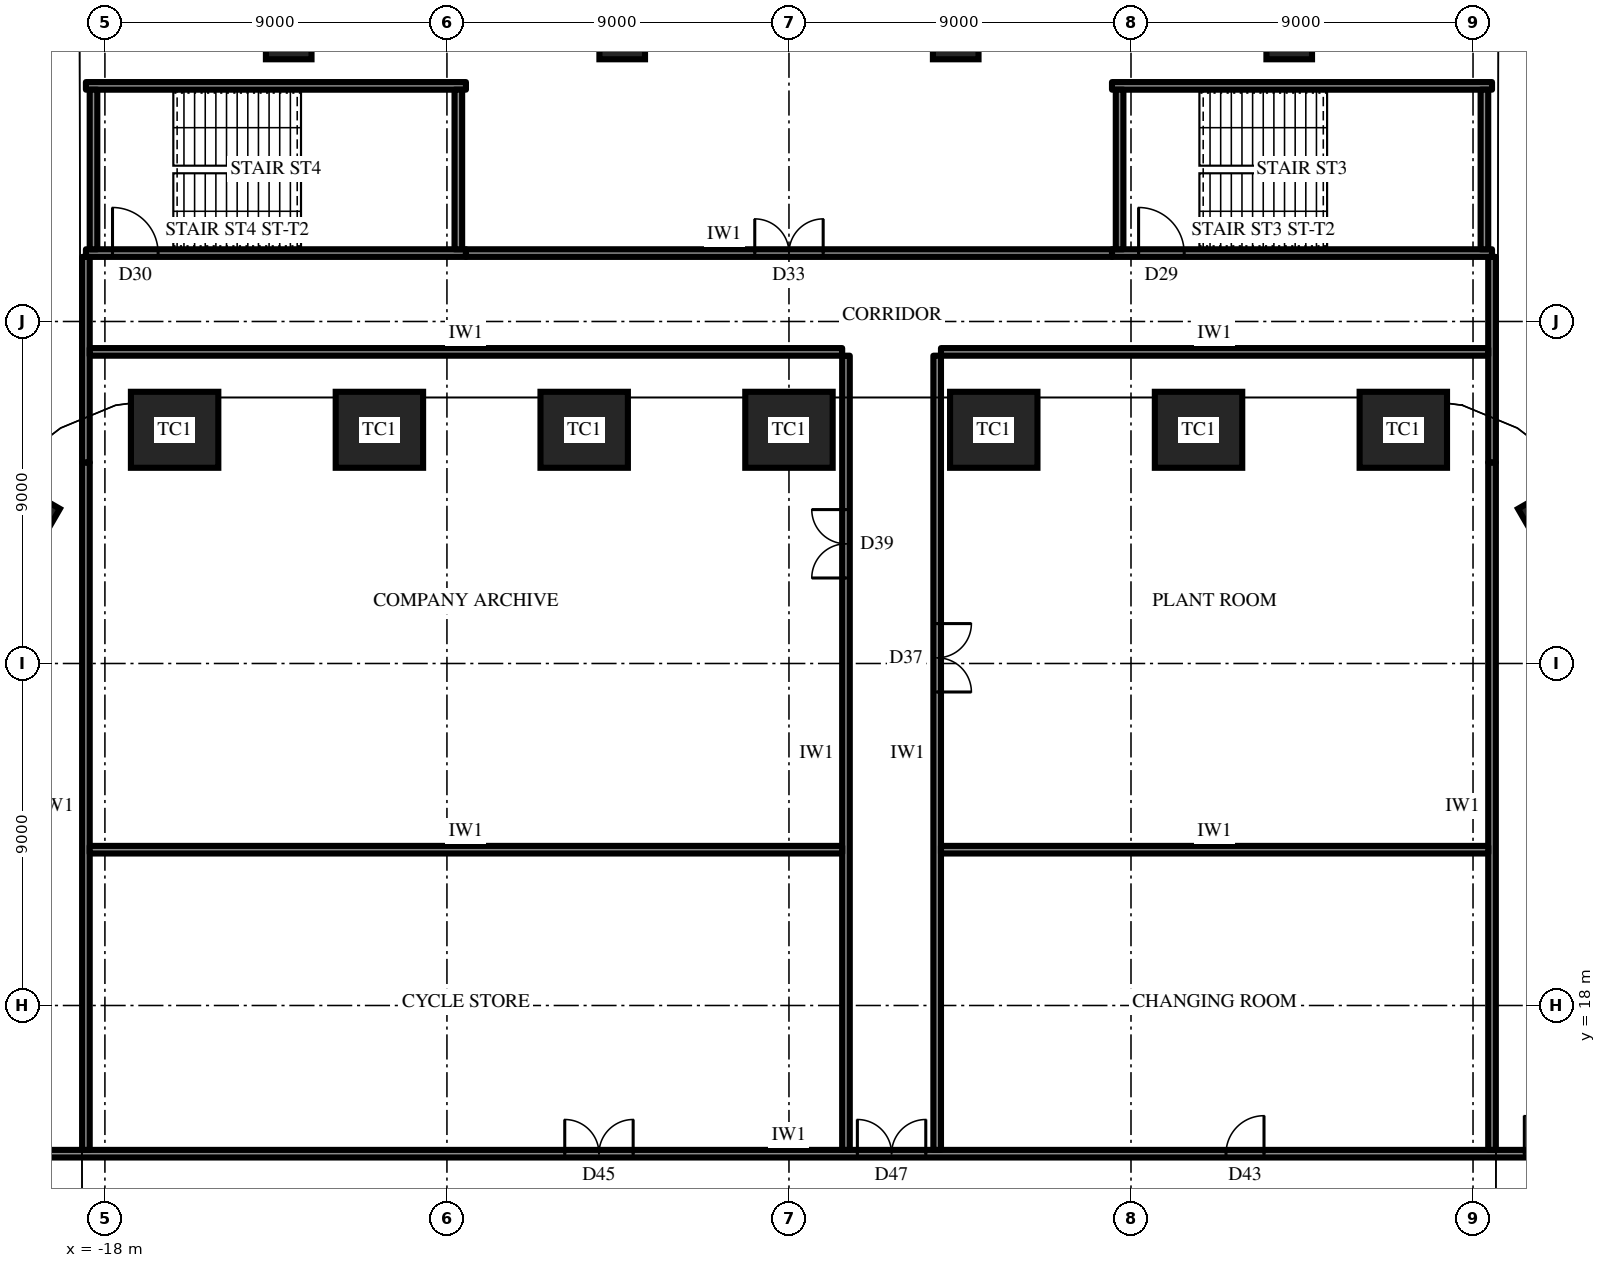
"""IFC4 building model, lengths in metres.
Left out: names, types, materials, properties, quantities, classifications, styles, units other than length and angle.
Written with IfcOpenShell. Run it as: python <this file> out.ifc"""

import sys

from ifc_helpers import new_model, si_unit, direction, frame, frame_2d, origin, origin_2d, place, context, subcontext, project, spatial, rectangle, extrude, element, fill, save


model = new_model("IFC4")
c1 = context("Model", 3, precision=1e-05, world=origin(), true_north=direction((0.0, 1.0)))
c2 = subcontext(c1, "Body", "Model", "MODEL_VIEW")
j1 = project(units=[si_unit("LENGTHUNIT", "METRE"), si_unit("PLANEANGLEUNIT", "RADIAN")], contexts=[c1])
p1 = place(None, origin())
s1 = spatial("IfcSite", under=j1, at=p1, CompositionType="ELEMENT")
p2 = place(p1, origin())
s2 = spatial("IfcBuilding", under=s1, at=p2, CompositionType="ELEMENT")
p3 = place(p2, frame((0.0, 0.0, -4.5)))
s3 = spatial("IfcBuildingStorey", under=s2, at=p3, CompositionType="ELEMENT", Elevation=-4.5)
for number, where, z_axis, x_axis in (
    (1, (20.626, 30.575, 0.0), (0.0, 0.0, 1.0), (-0.5, 0.866, 0.0)),
    (2, (16.166, 33.15, 0.0), (0.0, 0.0, 1.0), (-1.0, 0.0, 0.0)),
    (3, (10.777, 33.15, 0.0), (0.0, 0.0, 1.0), (-1.0, 0.0, 0.0)),
    (4, (5.389, 33.15, 0.0), (0.0, 0.0, 1.0), (-1.0, 0.0, 0.0)),
    (5, (0.0, 33.15, 0.0), (0.0, 0.0, 1.0), (-1.0, 0.0, 0.0)),
    (6, (-5.389, 33.15, 0.0), (0.0, 0.0, 1.0), (-1.0, 0.0, 0.0)),
    (7, (-10.777, 33.15, 0.0), (0.0, 0.0, 1.0), (-1.0, 0.0, 0.0)),
    (8, (-16.166, 33.15, 0.0), (0.0, 0.0, 1.0), (-1.0, 0.0, 0.0)),
    (9, (-20.626, 30.575, 0.0), (0.0, 0.0, 1.0), (-0.5, -0.866, 0.0)),
):
    element("IfcColumn", number, at=place(p3, frame(where, z_axis=z_axis, x_axis=x_axis)), inside=s3, PredefinedType="COLUMN", context=c2, shape_type="SweptSolid", body=[
        extrude(rectangle(XDim=2.3, YDim=2.0, at=origin_2d()), origin(), (0.0, 0.0, 1.0), 4.5),
    ])
p4 = place(p3, frame((8.5, 37.8, 0.0), z_axis=(0.0, 0.0, 1.0), x_axis=(1.0, 0.0, 0.0)))
e10 = element("IfcWall", 10, at=p4, inside=s3, PredefinedType="SHEAR", context=c2, shape_type="SweptSolid", body=[
    extrude(rectangle(XDim=10.0, YDim=0.2, at=frame_2d((5.0, 0.0))), origin(), (0.0, 0.0, 1.0), 4.5),
])
p5 = place(p4, frame((0.7, 0.0, 0.0)))
e11 = element("IfcOpeningElement", 11, at=p5, cuts=e10, PredefinedType="OPENING", context=c2, shape_type="SweptSolid", body=[
    extrude(rectangle(XDim=1.2, YDim=2.2, at=frame_2d((0.6, 1.1))), frame((0.0, 0.11, 0.0), z_axis=(0.0, -1.0, 0.0), x_axis=(1.0, 0.0, 0.0)), (0.0, 0.0, 1.0), 0.22),
])
p6 = place(p3, frame((18.5, 42.2, 0.0), z_axis=(0.0, 0.0, 1.0), x_axis=(-1.0, 0.0, 0.0)))
e12 = element("IfcWall", 12, at=p6, inside=s3, PredefinedType="SHEAR", context=c2, shape_type="SweptSolid", body=[
    extrude(rectangle(XDim=10.0, YDim=0.2, at=frame_2d((5.0, 0.0))), origin(), (0.0, 0.0, 1.0), 4.5),
])
for number, where, z_axis, x_axis in (
    (13, (8.7, 42.1, 0.0), (0.0, 0.0, 1.0), (0.0, -1.0, 0.0)),
    (14, (18.3, 37.9, 0.0), (0.0, 0.0, 1.0), (0.0, 1.0, 0.0)),
):
    element("IfcWall", number, at=place(p3, frame(where, z_axis=z_axis, x_axis=x_axis)), inside=s3, PredefinedType="SHEAR", context=c2, shape_type="SweptSolid", body=[
        extrude(rectangle(XDim=4.2, YDim=0.2, at=frame_2d((2.1, 0.0))), origin(), (0.0, 0.0, 1.0), 4.5),
    ])
p7 = place(p3, frame((-18.5, 37.8, 0.0), z_axis=(0.0, 0.0, 1.0), x_axis=(1.0, 0.0, 0.0)))
e15 = element("IfcWall", 15, at=p7, inside=s3, PredefinedType="SHEAR", context=c2, shape_type="SweptSolid", body=[
    extrude(rectangle(XDim=10.0, YDim=0.2, at=frame_2d((5.0, 0.0))), origin(), (0.0, 0.0, 1.0), 4.5),
])
p8 = place(p7, frame((0.7, 0.0, 0.0)))
e16 = element("IfcOpeningElement", 16, at=p8, cuts=e15, PredefinedType="OPENING", context=c2, shape_type="SweptSolid", body=[
    extrude(rectangle(XDim=1.2, YDim=2.2, at=frame_2d((0.6, 1.1))), frame((0.0, 0.11, 0.0), z_axis=(0.0, -1.0, 0.0), x_axis=(1.0, 0.0, 0.0)), (0.0, 0.0, 1.0), 0.22),
])
p9 = place(p3, frame((-8.5, 42.2, 0.0), z_axis=(0.0, 0.0, 1.0), x_axis=(-1.0, 0.0, 0.0)))
e17 = element("IfcWall", 17, at=p9, inside=s3, PredefinedType="SHEAR", context=c2, shape_type="SweptSolid", body=[
    extrude(rectangle(XDim=10.0, YDim=0.2, at=frame_2d((5.0, 0.0))), origin(), (0.0, 0.0, 1.0), 4.5),
])
for number, where, z_axis, x_axis in (
    (18, (-18.3, 42.1, 0.0), (0.0, 0.0, 1.0), (0.0, -1.0, 0.0)),
    (19, (-8.7, 37.9, 0.0), (0.0, 0.0, 1.0), (0.0, 1.0, 0.0)),
):
    element("IfcWall", number, at=place(p3, frame(where, z_axis=z_axis, x_axis=x_axis)), inside=s3, PredefinedType="SHEAR", context=c2, shape_type="SweptSolid", body=[
        extrude(rectangle(XDim=4.2, YDim=0.2, at=frame_2d((2.1, 0.0))), origin(), (0.0, 0.0, 1.0), 4.5),
    ])
for number, where, z_axis, x_axis in (
    (20, (13.164, 43.5, 0.0), (0.0, 0.0, 1.0), (-1.0, 0.0, 0.0)),
    (21, (4.388, 43.5, 0.0), (0.0, 0.0, 1.0), (-1.0, 0.0, 0.0)),
    (22, (-4.388, 43.5, 0.0), (0.0, 0.0, 1.0), (-1.0, 0.0, 0.0)),
    (23, (-13.164, 43.5, 0.0), (0.0, 0.0, 1.0), (-1.0, 0.0, 0.0)),
):
    element("IfcColumn", number, at=place(p3, frame(where, z_axis=z_axis, x_axis=x_axis)), inside=s3, PredefinedType="COLUMN", context=c2, shape_type="SweptSolid", body=[
        extrude(rectangle(XDim=1.2, YDim=1.2, at=origin_2d()), origin(), (0.0, 0.0, 1.0), 4.5),
    ])
p10 = place(p3, frame((-44.283, 14.1, 0.0), z_axis=(0.0, 0.0, 1.0), x_axis=(1.0, 0.0, 0.0)))
e24 = element("IfcWall", 24, at=p10, inside=s3, PredefinedType="PARTITIONING", context=c2, shape_type="SweptSolid", body=[
    extrude(rectangle(XDim=88.565, YDim=0.2, at=frame_2d((44.283, 0.0))), origin(), (0.0, 0.0, 1.0), 4.15),
])
p11 = place(p10, frame((38.383, 0.0, 0.0)))
e25 = element("IfcOpeningElement", 25, at=p11, cuts=e24, PredefinedType="OPENING", context=c2, shape_type="SweptSolid", body=[
    extrude(rectangle(XDim=1.8, YDim=2.4, at=frame_2d((0.9, 1.2))), frame((0.0, 0.11, 0.0), z_axis=(0.0, -1.0, 0.0), x_axis=(1.0, 0.0, 0.0)), (0.0, 0.0, 1.0), 0.22),
])
p12 = place(p10, frame((55.783, 0.0, 0.0)))
e26 = element("IfcOpeningElement", 26, at=p12, cuts=e24, PredefinedType="OPENING", context=c2, shape_type="SweptSolid", body=[
    extrude(rectangle(XDim=1.0, YDim=2.2, at=frame_2d((0.5, 1.1))), frame((0.0, 0.11, 0.0), z_axis=(0.0, -1.0, 0.0), x_axis=(1.0, 0.0, 0.0)), (0.0, 0.0, 1.0), 0.22),
])
p13 = place(p10, frame((46.083, 0.0, 0.0)))
e27 = element("IfcOpeningElement", 27, at=p13, cuts=e24, PredefinedType="OPENING", context=c2, shape_type="SweptSolid", body=[
    extrude(rectangle(XDim=1.8, YDim=2.4, at=frame_2d((0.9, 1.2))), frame((0.0, 0.11, 0.0), z_axis=(0.0, -1.0, 0.0), x_axis=(1.0, 0.0, 0.0)), (0.0, 0.0, 1.0), 0.22),
])
p14 = place(p10, frame((63.633, 0.0, 0.0)))
e28 = element("IfcOpeningElement", 28, at=p14, cuts=e24, PredefinedType="OPENING", context=c2, shape_type="SweptSolid", body=[
    extrude(rectangle(XDim=1.0, YDim=2.2, at=frame_2d((0.5, 1.1))), frame((0.0, 0.11, 0.0), z_axis=(0.0, -1.0, 0.0), x_axis=(1.0, 0.0, 0.0)), (0.0, 0.0, 1.0), 0.22),
])
p15 = place(p3, frame((-18.5, 14.2, 0.0), z_axis=(0.0, 0.0, 1.0), x_axis=(0.0, 1.0, 0.0)))
e29 = element("IfcWall", 29, at=p15, inside=s3, PredefinedType="PARTITIONING", context=c2, shape_type="SweptSolid", body=[
    extrude(rectangle(XDim=18.09, YDim=0.2, at=frame_2d((9.045, 0.0))), origin(), (0.0, 0.0, 1.0), 3.094),
])
p16 = place(p3, frame((-18.5, 32.29, 0.0), z_axis=(0.0, 0.0, 1.0), x_axis=(0.0, 1.0, 0.0)))
e30 = element("IfcWall", 30, at=p16, inside=s3, PredefinedType="PARTITIONING", context=c2, shape_type="SweptSolid", body=[
    extrude(rectangle(XDim=5.41, YDim=0.2, at=frame_2d((2.705, 0.0))), origin(), (0.0, 0.0, 1.0), 4.15),
])
p17 = place(p3, frame((18.5, 14.2, 0.0), z_axis=(0.0, 0.0, 1.0), x_axis=(0.0, 1.0, 0.0)))
e31 = element("IfcWall", 31, at=p17, inside=s3, PredefinedType="PARTITIONING", context=c2, shape_type="SweptSolid", body=[
    extrude(rectangle(XDim=18.09, YDim=0.2, at=frame_2d((9.045, 0.0))), origin(), (0.0, 0.0, 1.0), 3.094),
])
p18 = place(p3, frame((18.5, 32.29, 0.0), z_axis=(0.0, 0.0, 1.0), x_axis=(0.0, 1.0, 0.0)))
e32 = element("IfcWall", 32, at=p18, inside=s3, PredefinedType="PARTITIONING", context=c2, shape_type="SweptSolid", body=[
    extrude(rectangle(XDim=5.41, YDim=0.2, at=frame_2d((2.705, 0.0))), origin(), (0.0, 0.0, 1.0), 4.15),
])
p19 = place(p3, frame((1.5, 14.2, 0.0), z_axis=(0.0, 0.0, 1.0), x_axis=(0.0, 1.0, 0.0)))
e33 = element("IfcWall", 33, at=p19, inside=s3, PredefinedType="PARTITIONING", context=c2, shape_type="SweptSolid", body=[
    extrude(rectangle(XDim=20.9, YDim=0.2, at=frame_2d((10.45, 0.0))), origin(), (0.0, 0.0, 1.0), 4.15),
])
p20 = place(p19, frame((15.05, 0.0, 0.0)))
e34 = element("IfcOpeningElement", 34, at=p20, cuts=e33, PredefinedType="OPENING", context=c2, shape_type="SweptSolid", body=[
    extrude(rectangle(XDim=1.8, YDim=2.4, at=frame_2d((0.9, 1.2))), frame((0.0, 0.11, 0.0), z_axis=(0.0, -1.0, 0.0), x_axis=(1.0, 0.0, 0.0)), (0.0, 0.0, 1.0), 0.22),
])
p21 = place(p3, frame((3.9, 14.2, 0.0), z_axis=(0.0, 0.0, 1.0), x_axis=(0.0, 1.0, 0.0)))
e35 = element("IfcWall", 35, at=p21, inside=s3, PredefinedType="PARTITIONING", context=c2, shape_type="SweptSolid", body=[
    extrude(rectangle(XDim=20.9, YDim=0.2, at=frame_2d((10.45, 0.0))), origin(), (0.0, 0.0, 1.0), 4.15),
])
p22 = place(p21, frame((12.05, 0.0, 0.0)))
e36 = element("IfcOpeningElement", 36, at=p22, cuts=e35, PredefinedType="OPENING", context=c2, shape_type="SweptSolid", body=[
    extrude(rectangle(XDim=1.8, YDim=2.4, at=frame_2d((0.9, 1.2))), frame((0.0, 0.11, 0.0), z_axis=(0.0, -1.0, 0.0), x_axis=(1.0, 0.0, 0.0)), (0.0, 0.0, 1.0), 0.22),
])
p23 = place(p3, frame((-18.4, 22.1, 0.0), z_axis=(0.0, 0.0, 1.0), x_axis=(1.0, 0.0, 0.0)))
e37 = element("IfcWall", 37, at=p23, inside=s3, PredefinedType="PARTITIONING", context=c2, shape_type="SweptSolid", body=[
    extrude(rectangle(XDim=19.8, YDim=0.2, at=frame_2d((9.9, 0.0))), origin(), (0.0, 0.0, 1.0), 4.15),
])
p24 = place(p3, frame((4.0, 22.1, 0.0), z_axis=(0.0, 0.0, 1.0), x_axis=(1.0, 0.0, 0.0)))
e38 = element("IfcWall", 38, at=p24, inside=s3, PredefinedType="PARTITIONING", context=c2, shape_type="SweptSolid", body=[
    extrude(rectangle(XDim=14.4, YDim=0.2, at=frame_2d((7.2, 0.0))), origin(), (0.0, 0.0, 1.0), 4.15),
])
p25 = place(p3, frame((-18.4, 35.2, 0.0), z_axis=(0.0, 0.0, 1.0), x_axis=(1.0, 0.0, 0.0)))
e39 = element("IfcWall", 39, at=p25, inside=s3, PredefinedType="PARTITIONING", context=c2, shape_type="SweptSolid", body=[
    extrude(rectangle(XDim=19.8, YDim=0.2, at=frame_2d((9.9, 0.0))), origin(), (0.0, 0.0, 1.0), 4.15),
])
p26 = place(p3, frame((4.0, 35.2, 0.0), z_axis=(0.0, 0.0, 1.0), x_axis=(1.0, 0.0, 0.0)))
e40 = element("IfcWall", 40, at=p26, inside=s3, PredefinedType="PARTITIONING", context=c2, shape_type="SweptSolid", body=[
    extrude(rectangle(XDim=14.4, YDim=0.2, at=frame_2d((7.2, 0.0))), origin(), (0.0, 0.0, 1.0), 4.15),
])
p27 = place(p3, frame((-8.5, 37.8, 0.0), z_axis=(0.0, 0.0, 1.0), x_axis=(1.0, 0.0, 0.0)))
e41 = element("IfcWall", 41, at=p27, inside=s3, PredefinedType="PARTITIONING", context=c2, shape_type="SweptSolid", body=[
    extrude(rectangle(XDim=17.0, YDim=0.2, at=frame_2d((8.5, 0.0))), origin(), (0.0, 0.0, 1.0), 4.15),
])
p28 = place(p27, frame((7.6, 0.0, 0.0)))
e42 = element("IfcOpeningElement", 42, at=p28, cuts=e41, PredefinedType="OPENING", context=c2, shape_type="SweptSolid", body=[
    extrude(rectangle(XDim=1.8, YDim=2.4, at=frame_2d((0.9, 1.2))), frame((0.0, 0.11, 0.0), z_axis=(0.0, -1.0, 0.0), x_axis=(1.0, 0.0, 0.0)), (0.0, 0.0, 1.0), 0.22),
])
p29 = place(p11, origin())
e43 = element("IfcDoor", 43, at=p29, inside=s3, OperationType="DOUBLE_DOOR_SINGLE_SWING", PredefinedType="DOOR", context=c2, shape_type="SweptSolid", body=[
    extrude(rectangle(XDim=1.8, YDim=2.4, at=frame_2d((0.9, 1.2))), frame((0.0, 0.025, 0.0), z_axis=(0.0, -1.0, 0.0), x_axis=(1.0, 0.0, 0.0)), (0.0, 0.0, 1.0), 0.05),
])
fill(e25, e43)
p30 = place(p12, origin())
e44 = element("IfcDoor", 44, at=p30, inside=s3, OperationType="SINGLE_SWING_LEFT", PredefinedType="DOOR", context=c2, shape_type="SweptSolid", body=[
    extrude(rectangle(XDim=1.0, YDim=2.2, at=frame_2d((0.5, 1.1))), frame((0.0, 0.025, 0.0), z_axis=(0.0, -1.0, 0.0), x_axis=(1.0, 0.0, 0.0)), (0.0, 0.0, 1.0), 0.05),
])
fill(e26, e44)
p31 = place(p13, origin())
e45 = element("IfcDoor", 45, at=p31, inside=s3, OperationType="DOUBLE_DOOR_SINGLE_SWING", PredefinedType="DOOR", context=c2, shape_type="SweptSolid", body=[
    extrude(rectangle(XDim=1.8, YDim=2.4, at=frame_2d((0.9, 1.2))), frame((0.0, 0.025, 0.0), z_axis=(0.0, -1.0, 0.0), x_axis=(1.0, 0.0, 0.0)), (0.0, 0.0, 1.0), 0.05),
])
fill(e27, e45)
p32 = place(p20, origin())
e46 = element("IfcDoor", 46, at=p32, inside=s3, OperationType="DOUBLE_DOOR_SINGLE_SWING", PredefinedType="DOOR", context=c2, shape_type="SweptSolid", body=[
    extrude(rectangle(XDim=1.8, YDim=2.4, at=frame_2d((0.9, 1.2))), frame((0.0, 0.025, 0.0), z_axis=(0.0, -1.0, 0.0), x_axis=(1.0, 0.0, 0.0)), (0.0, 0.0, 1.0), 0.05),
])
fill(e34, e46)
p33 = place(p22, frame((1.8, 0.0, 0.0), z_axis=(0.0, 0.0, 1.0), x_axis=(-1.0, 0.0, 0.0)))
e47 = element("IfcDoor", 47, at=p33, inside=s3, OperationType="DOUBLE_DOOR_SINGLE_SWING", PredefinedType="DOOR", context=c2, shape_type="SweptSolid", body=[
    extrude(rectangle(XDim=1.8, YDim=2.4, at=frame_2d((0.9, 1.2))), frame((0.0, 0.025, 0.0), z_axis=(0.0, -1.0, 0.0), x_axis=(1.0, 0.0, 0.0)), (0.0, 0.0, 1.0), 0.05),
])
fill(e36, e47)
p34 = place(p28, origin())
e48 = element("IfcDoor", 48, at=p34, inside=s3, OperationType="DOUBLE_DOOR_SINGLE_SWING", PredefinedType="DOOR", context=c2, shape_type="SweptSolid", body=[
    extrude(rectangle(XDim=1.8, YDim=2.4, at=frame_2d((0.9, 1.2))), frame((0.0, 0.025, 0.0), z_axis=(0.0, -1.0, 0.0), x_axis=(1.0, 0.0, 0.0)), (0.0, 0.0, 1.0), 0.05),
])
fill(e42, e48)
p35 = place(p14, origin())
e49 = element("IfcDoor", 49, at=p35, inside=s3, OperationType="SINGLE_SWING_RIGHT", PredefinedType="DOOR", context=c2, shape_type="SweptSolid", body=[
    extrude(rectangle(XDim=1.0, YDim=2.2, at=frame_2d((0.5, 1.1))), frame((0.0, 0.025, 0.0), z_axis=(0.0, -1.0, 0.0), x_axis=(1.0, 0.0, 0.0)), (0.0, 0.0, 1.0), 0.05),
])
fill(e28, e49)
p36 = place(p5, origin())
e50 = element("IfcDoor", 50, at=p36, inside=s3, OperationType="SINGLE_SWING_RIGHT", PredefinedType="DOOR", context=c2, shape_type="SweptSolid", body=[
    extrude(rectangle(XDim=1.2, YDim=2.2, at=frame_2d((0.6, 1.1))), frame((0.0, 0.025, 0.0), z_axis=(0.0, -1.0, 0.0), x_axis=(1.0, 0.0, 0.0)), (0.0, 0.0, 1.0), 0.05),
])
fill(e11, e50)
p37 = place(p8, origin())
e51 = element("IfcDoor", 51, at=p37, inside=s3, OperationType="SINGLE_SWING_RIGHT", PredefinedType="DOOR", context=c2, shape_type="SweptSolid", body=[
    extrude(rectangle(XDim=1.2, YDim=2.2, at=frame_2d((0.6, 1.1))), frame((0.0, 0.025, 0.0), z_axis=(0.0, -1.0, 0.0), x_axis=(1.0, 0.0, 0.0)), (0.0, 0.0, 1.0), 0.05),
])
fill(e16, e51)
save(model, sys.argv[1])
